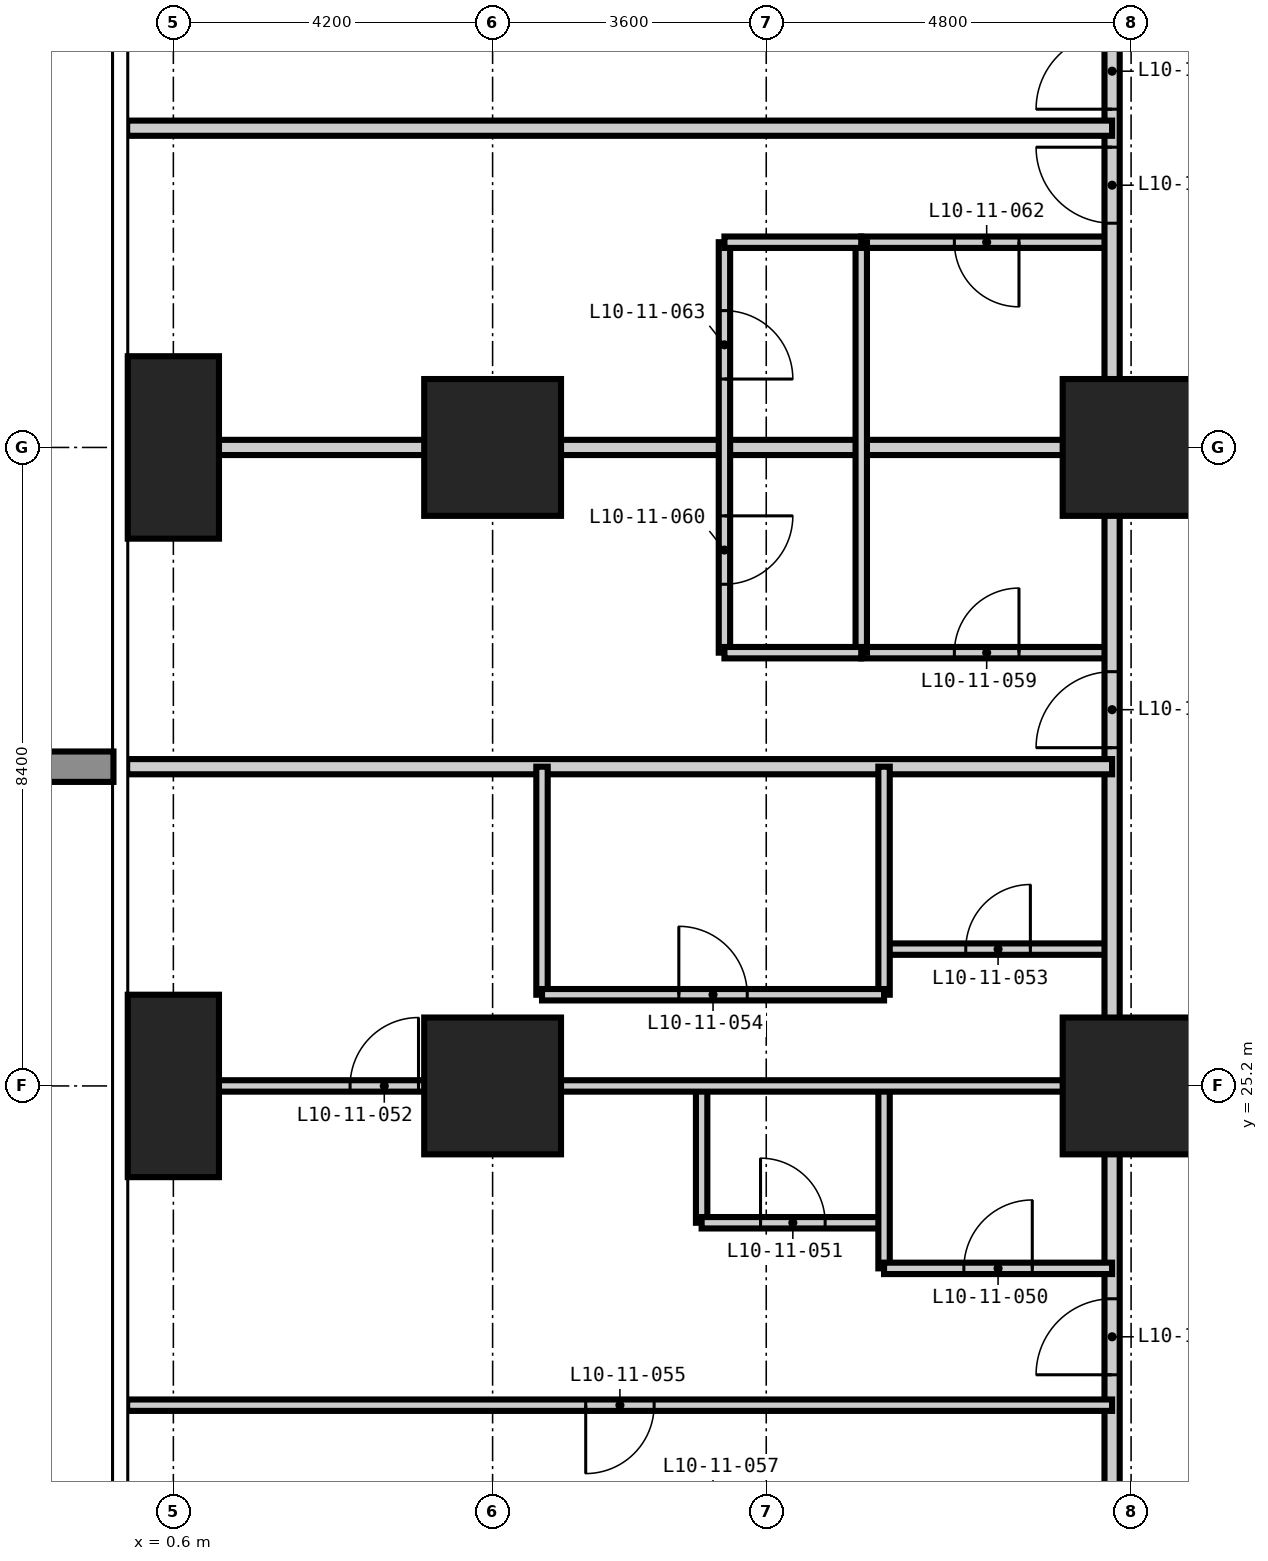
"""IFC4 building model, lengths in metres.
Left out: names, types, materials, properties, quantities, classifications, styles, units other than length and angle.
Written with IfcOpenShell. Run it as: python <this file> out.ifc"""

import sys

from ifc_helpers import new_model, si_unit, direction, frame, frame_2d, origin, origin_2d, place, context, subcontext, project, spatial, rectangle, extrude, element, fill, save


model = new_model("IFC4")
c1 = context("Model", 3, precision=1e-05, world=origin(), true_north=direction((0.0, 1.0)))
c2 = subcontext(c1, "Body", "Model", "MODEL_VIEW")
j1 = project(units=[si_unit("LENGTHUNIT", "METRE"), si_unit("PLANEANGLEUNIT", "RADIAN")], contexts=[c1])
p1 = place(None, origin())
s1 = spatial("IfcSite", under=j1, at=p1, CompositionType="ELEMENT")
p2 = place(p1, origin())
s2 = spatial("IfcBuilding", under=s1, at=p2, CompositionType="ELEMENT")
p3 = place(p2, frame((0.0, 0.0, 45.0)))
s3 = spatial("IfcBuildingStorey", under=s2, at=p3, CompositionType="ELEMENT", Elevation=45.0)
for number, where, z_axis, x_axis in (
    (1, (0.6, 25.2, -0.35), (0.0, 0.0, 1.0), (1.0, 0.0, 0.0)),
    (2, (0.6, 33.6, -0.35), (0.0, 0.0, 1.0), (1.0, 0.0, 0.0)),
):
    element("IfcColumn", number, at=place(p3, frame(where, z_axis=z_axis, x_axis=x_axis)), inside=s3, PredefinedType="COLUMN", context=c2, shape_type="SweptSolid", body=[
        extrude(rectangle(XDim=1.2, YDim=2.4, at=origin_2d()), origin(), (0.0, 0.0, 1.0), 3.6),
    ])
for number, where, z_axis, x_axis in (
    (3, (4.8, 25.2, -0.35), (0.0, 0.0, 1.0), (1.0, 0.0, 0.0)),
    (4, (4.8, 33.6, -0.35), (0.0, 0.0, 1.0), (1.0, 0.0, 0.0)),
    (5, (13.2, 25.2, -0.35), (0.0, 0.0, 1.0), (1.0, 0.0, 0.0)),
    (6, (13.2, 33.6, -0.35), (0.0, 0.0, 1.0), (1.0, 0.0, 0.0)),
):
    element("IfcColumn", number, at=place(p3, frame(where, z_axis=z_axis, x_axis=x_axis)), inside=s3, PredefinedType="COLUMN", context=c2, shape_type="SweptSolid", body=[
        extrude(rectangle(XDim=1.8, YDim=1.8, at=origin_2d()), origin(), (0.0, 0.0, 1.0), 3.6),
    ])
p4 = place(p3, frame((7.55, 23.4, 0.0), z_axis=(0.0, 0.0, 1.0), x_axis=(0.0, 1.0, 0.0)))
e7 = element("IfcWall", 7, at=p4, inside=s3, PredefinedType="PARTITIONING", context=c2, shape_type="SweptSolid", body=[
    extrude(rectangle(XDim=1.8, YDim=0.15, at=frame_2d((0.9, 0.0))), origin(), (0.0, 0.0, 1.0), 3.25),
])
p5 = place(p3, frame((7.55, 23.4, 0.0), z_axis=(0.0, 0.0, 1.0), x_axis=(1.0, 0.0, 0.0)))
e8 = element("IfcWall", 8, at=p5, inside=s3, PredefinedType="PARTITIONING", context=c2, shape_type="SweptSolid", body=[
    extrude(rectangle(XDim=2.4, YDim=0.15, at=frame_2d((1.2, 0.0))), origin(), (0.0, 0.0, 1.0), 3.25),
])
p6 = place(p5, frame((0.775, 0.0, 0.0)))
e9 = element("IfcOpeningElement", 9, at=p6, cuts=e8, PredefinedType="OPENING", context=c2, shape_type="SweptSolid", body=[
    extrude(rectangle(XDim=0.85, YDim=2.1, at=frame_2d((0.425, 1.05))), frame((0.0, 0.085, 0.0), z_axis=(0.0, -1.0, 0.0), x_axis=(1.0, 0.0, 0.0)), (0.0, 0.0, 1.0), 0.17),
])
p7 = place(p3, frame((9.95, 27.0, 0.0), z_axis=(0.0, 0.0, 1.0), x_axis=(1.0, 0.0, 0.0)))
e10 = element("IfcWall", 10, at=p7, inside=s3, PredefinedType="PARTITIONING", context=c2, shape_type="SweptSolid", body=[
    extrude(rectangle(XDim=3.0, YDim=0.15, at=frame_2d((1.5, 0.0))), origin(), (0.0, 0.0, 1.0), 3.25),
])
p8 = place(p7, frame((1.075, 0.0, 0.0)))
e11 = element("IfcOpeningElement", 11, at=p8, cuts=e10, PredefinedType="OPENING", context=c2, shape_type="SweptSolid", body=[
    extrude(rectangle(XDim=0.85, YDim=2.1, at=frame_2d((0.425, 1.05))), frame((0.0, 0.085, 0.0), z_axis=(0.0, -1.0, 0.0), x_axis=(1.0, 0.0, 0.0)), (0.0, 0.0, 1.0), 0.17),
])
p9 = place(p3, frame((9.65, 30.9, 0.0), z_axis=(0.0, 0.0, 1.0), x_axis=(1.0, 0.0, 0.0)))
e12 = element("IfcWall", 12, at=p9, inside=s3, PredefinedType="PARTITIONING", context=c2, shape_type="SweptSolid", body=[
    extrude(rectangle(XDim=3.3, YDim=0.15, at=frame_2d((1.65, 0.0))), origin(), (0.0, 0.0, 1.0), 3.25),
])
p10 = place(p9, frame((1.225, 0.0, 0.0)))
e13 = element("IfcOpeningElement", 13, at=p10, cuts=e12, PredefinedType="OPENING", context=c2, shape_type="SweptSolid", body=[
    extrude(rectangle(XDim=0.85, YDim=2.1, at=frame_2d((0.425, 1.05))), frame((0.0, 0.085, 0.0), z_axis=(0.0, -1.0, 0.0), x_axis=(1.0, 0.0, 0.0)), (0.0, 0.0, 1.0), 0.17),
])
p11 = place(p3, frame((9.65, 36.3, 0.0), z_axis=(0.0, 0.0, 1.0), x_axis=(1.0, 0.0, 0.0)))
e14 = element("IfcWall", 14, at=p11, inside=s3, PredefinedType="PARTITIONING", context=c2, shape_type="SweptSolid", body=[
    extrude(rectangle(XDim=3.3, YDim=0.15, at=frame_2d((1.65, 0.0))), origin(), (0.0, 0.0, 1.0), 3.25),
])
p12 = place(p11, frame((1.225, 0.0, 0.0)))
e15 = element("IfcOpeningElement", 15, at=p12, cuts=e14, PredefinedType="OPENING", context=c2, shape_type="SweptSolid", body=[
    extrude(rectangle(XDim=0.85, YDim=2.1, at=frame_2d((0.425, 1.05))), frame((0.0, 0.085, 0.0), z_axis=(0.0, -1.0, 0.0), x_axis=(1.0, 0.0, 0.0)), (0.0, 0.0, 1.0), 0.17),
])
p13 = place(p3, frame((12.95, 12.95, 0.0), z_axis=(0.0, 0.0, 1.0), x_axis=(0.0, 1.0, 0.0)))
e16 = element("IfcWall", 16, at=p13, inside=s3, PredefinedType="PARTITIONING", context=c2, shape_type="SweptSolid", body=[
    extrude(rectangle(XDim=32.6, YDim=0.2, at=frame_2d((16.3, 0.0))), origin(), (0.0, 0.0, 1.0), 3.25),
])
p14 = place(p13, frame((8.45, 0.0, 0.0)))
e17 = element("IfcOpeningElement", 17, at=p14, cuts=e16, PredefinedType="OPENING", context=c2, shape_type="SweptSolid", body=[
    extrude(rectangle(XDim=1.0, YDim=2.2, at=frame_2d((0.5, 1.1))), frame((0.0, 0.11, 0.0), z_axis=(0.0, -1.0, 0.0), x_axis=(1.0, 0.0, 0.0)), (0.0, 0.0, 1.0), 0.22),
])
p15 = place(p13, frame((16.7, 0.0, 0.0)))
e18 = element("IfcOpeningElement", 18, at=p15, cuts=e16, PredefinedType="OPENING", context=c2, shape_type="SweptSolid", body=[
    extrude(rectangle(XDim=1.0, YDim=2.2, at=frame_2d((0.5, 1.1))), frame((0.0, 0.11, 0.0), z_axis=(0.0, -1.0, 0.0), x_axis=(1.0, 0.0, 0.0)), (0.0, 0.0, 1.0), 0.22),
])
p16 = place(p13, frame((23.6, 0.0, 0.0)))
e19 = element("IfcOpeningElement", 19, at=p16, cuts=e16, PredefinedType="OPENING", context=c2, shape_type="SweptSolid", body=[
    extrude(rectangle(XDim=1.0, YDim=2.2, at=frame_2d((0.5, 1.1))), frame((0.0, 0.11, 0.0), z_axis=(0.0, -1.0, 0.0), x_axis=(1.0, 0.0, 0.0)), (0.0, 0.0, 1.0), 0.22),
])
p17 = place(p13, frame((25.1, 0.0, 0.0)))
e20 = element("IfcOpeningElement", 20, at=p17, cuts=e16, PredefinedType="OPENING", context=c2, shape_type="SweptSolid", body=[
    extrude(rectangle(XDim=1.0, YDim=2.2, at=frame_2d((0.5, 1.1))), frame((0.0, 0.11, 0.0), z_axis=(0.0, -1.0, 0.0), x_axis=(1.0, 0.0, 0.0)), (0.0, 0.0, 1.0), 0.22),
])
p18 = place(p13, frame((1.425, 0.0, 0.0)))
e21 = element("IfcOpeningElement", 21, at=p18, cuts=e16, PredefinedType="OPENING", context=c2, shape_type="SweptSolid", body=[
    extrude(rectangle(XDim=1.0, YDim=2.2, at=frame_2d((0.5, 1.1))), frame((0.0, 0.11, 0.0), z_axis=(0.0, -1.0, 0.0), x_axis=(1.0, 0.0, 0.0)), (0.0, 0.0, 1.0), 0.22),
])
p19 = place(p13, frame((30.325, 0.0, 0.0)))
e22 = element("IfcOpeningElement", 22, at=p19, cuts=e16, PredefinedType="OPENING", context=c2, shape_type="SweptSolid", body=[
    extrude(rectangle(XDim=1.0, YDim=2.2, at=frame_2d((0.5, 1.1))), frame((0.0, 0.11, 0.0), z_axis=(0.0, -1.0, 0.0), x_axis=(1.0, 0.0, 0.0)), (0.0, 0.0, 1.0), 0.22),
])
for number, where, z_axis, x_axis in (
    (23, (-0.008, 29.4, 0.0), (0.0, 0.0, 1.0), (1.0, 0.0, 0.0)),
    (24, (-0.008, 33.6, 0.0), (0.0, 0.0, 1.0), (1.0, 0.0, 0.0)),
    (25, (-0.008, 37.8, 0.0), (0.0, 0.0, 1.0), (1.0, 0.0, 0.0)),
):
    element("IfcWall", number, at=place(p3, frame(where, z_axis=z_axis, x_axis=x_axis)), inside=s3, PredefinedType="PARTITIONING", context=c2, shape_type="SweptSolid", body=[
        extrude(rectangle(XDim=12.958, YDim=0.2, at=frame_2d((6.479, 0.0))), origin(), (0.0, 0.0, 1.0), 3.25),
    ])
p20 = place(p3, frame((5.45, 26.4, 0.0), z_axis=(0.0, 0.0, 1.0), x_axis=(0.0, 1.0, 0.0)))
e26 = element("IfcWall", 26, at=p20, inside=s3, PredefinedType="PARTITIONING", context=c2, shape_type="SweptSolid", body=[
    extrude(rectangle(XDim=3.0, YDim=0.15, at=frame_2d((1.5, 0.0))), origin(), (0.0, 0.0, 1.0), 3.25),
])
p21 = place(p3, frame((7.85, 30.9, 0.0), z_axis=(0.0, 0.0, 1.0), x_axis=(0.0, 1.0, 0.0)))
e27 = element("IfcWall", 27, at=p21, inside=s3, PredefinedType="PARTITIONING", context=c2, shape_type="SweptSolid", body=[
    extrude(rectangle(XDim=5.4, YDim=0.15, at=frame_2d((2.7, 0.0))), origin(), (0.0, 0.0, 1.0), 3.25),
])
p22 = place(p21, frame((0.9, 0.0, 0.0)))
e28 = element("IfcOpeningElement", 28, at=p22, cuts=e27, PredefinedType="OPENING", context=c2, shape_type="SweptSolid", body=[
    extrude(rectangle(XDim=0.9, YDim=2.1, at=frame_2d((0.45, 1.05))), frame((0.0, 0.085, 0.0), z_axis=(0.0, -1.0, 0.0), x_axis=(1.0, 0.0, 0.0)), (0.0, 0.0, 1.0), 0.17),
])
p23 = place(p21, frame((3.6, 0.0, 0.0)))
e29 = element("IfcOpeningElement", 29, at=p23, cuts=e27, PredefinedType="OPENING", context=c2, shape_type="SweptSolid", body=[
    extrude(rectangle(XDim=0.9, YDim=2.1, at=frame_2d((0.45, 1.05))), frame((0.0, 0.085, 0.0), z_axis=(0.0, -1.0, 0.0), x_axis=(1.0, 0.0, 0.0)), (0.0, 0.0, 1.0), 0.17),
])
p24 = place(p3, frame((9.65, 30.9, 0.0), z_axis=(0.0, 0.0, 1.0), x_axis=(0.0, 1.0, 0.0)))
e30 = element("IfcWall", 30, at=p24, inside=s3, PredefinedType="PARTITIONING", context=c2, shape_type="SweptSolid", body=[
    extrude(rectangle(XDim=5.4, YDim=0.15, at=frame_2d((2.7, 0.0))), origin(), (0.0, 0.0, 1.0), 3.25),
])
p25 = place(p3, frame((9.95, 22.8, 0.0), z_axis=(0.0, 0.0, 1.0), x_axis=(0.0, 1.0, 0.0)))
e31 = element("IfcWall", 31, at=p25, inside=s3, PredefinedType="PARTITIONING", context=c2, shape_type="SweptSolid", body=[
    extrude(rectangle(XDim=2.4, YDim=0.15, at=frame_2d((1.2, 0.0))), origin(), (0.0, 0.0, 1.0), 3.25),
])
p26 = place(p3, frame((9.95, 26.4, 0.0), z_axis=(0.0, 0.0, 1.0), x_axis=(0.0, 1.0, 0.0)))
e32 = element("IfcWall", 32, at=p26, inside=s3, PredefinedType="PARTITIONING", context=c2, shape_type="SweptSolid", body=[
    extrude(rectangle(XDim=3.0, YDim=0.15, at=frame_2d((1.5, 0.0))), origin(), (0.0, 0.0, 1.0), 3.25),
])
p27 = place(p3, frame((-0.008, 21.0, 0.0), z_axis=(0.0, 0.0, 1.0), x_axis=(1.0, 0.0, 0.0)))
e33 = element("IfcWall", 33, at=p27, inside=s3, PredefinedType="PARTITIONING", context=c2, shape_type="SweptSolid", body=[
    extrude(rectangle(XDim=12.958, YDim=0.15, at=frame_2d((6.479, 0.0))), origin(), (0.0, 0.0, 1.0), 3.25),
])
p28 = place(p27, frame((6.033, 0.0, 0.0)))
e34 = element("IfcOpeningElement", 34, at=p28, cuts=e33, PredefinedType="OPENING", context=c2, shape_type="SweptSolid", body=[
    extrude(rectangle(XDim=0.9, YDim=2.1, at=frame_2d((0.45, 1.05))), frame((0.0, 0.085, 0.0), z_axis=(0.0, -1.0, 0.0), x_axis=(1.0, 0.0, 0.0)), (0.0, 0.0, 1.0), 0.17),
])
p29 = place(p3, frame((9.95, 22.8, 0.0), z_axis=(0.0, 0.0, 1.0), x_axis=(1.0, 0.0, 0.0)))
e35 = element("IfcWall", 35, at=p29, inside=s3, PredefinedType="PARTITIONING", context=c2, shape_type="SweptSolid", body=[
    extrude(rectangle(XDim=3.0, YDim=0.15, at=frame_2d((1.5, 0.0))), origin(), (0.0, 0.0, 1.0), 3.25),
])
p30 = place(p29, frame((1.05, 0.0, 0.0)))
e36 = element("IfcOpeningElement", 36, at=p30, cuts=e35, PredefinedType="OPENING", context=c2, shape_type="SweptSolid", body=[
    extrude(rectangle(XDim=0.9, YDim=2.1, at=frame_2d((0.45, 1.05))), frame((0.0, 0.085, 0.0), z_axis=(0.0, -1.0, 0.0), x_axis=(1.0, 0.0, 0.0)), (0.0, 0.0, 1.0), 0.17),
])
p31 = place(p3, frame((-0.008, 25.2, 0.0), z_axis=(0.0, 0.0, 1.0), x_axis=(1.0, 0.0, 0.0)))
e37 = element("IfcWall", 37, at=p31, inside=s3, PredefinedType="PARTITIONING", context=c2, shape_type="SweptSolid", body=[
    extrude(rectangle(XDim=12.958, YDim=0.15, at=frame_2d((6.479, 0.0))), origin(), (0.0, 0.0, 1.0), 3.25),
])
p32 = place(p31, frame((2.933, 0.0, 0.0)))
e38 = element("IfcOpeningElement", 38, at=p32, cuts=e37, PredefinedType="OPENING", context=c2, shape_type="SweptSolid", body=[
    extrude(rectangle(XDim=0.9, YDim=2.1, at=frame_2d((0.45, 1.05))), frame((0.0, 0.085, 0.0), z_axis=(0.0, -1.0, 0.0), x_axis=(1.0, 0.0, 0.0)), (0.0, 0.0, 1.0), 0.17),
])
p33 = place(p3, frame((5.45, 26.4, 0.0), z_axis=(0.0, 0.0, 1.0), x_axis=(1.0, 0.0, 0.0)))
e39 = element("IfcWall", 39, at=p33, inside=s3, PredefinedType="PARTITIONING", context=c2, shape_type="SweptSolid", body=[
    extrude(rectangle(XDim=4.5, YDim=0.15, at=frame_2d((2.25, 0.0))), origin(), (0.0, 0.0, 1.0), 3.25),
])
p34 = place(p33, frame((1.8, 0.0, 0.0)))
e40 = element("IfcOpeningElement", 40, at=p34, cuts=e39, PredefinedType="OPENING", context=c2, shape_type="SweptSolid", body=[
    extrude(rectangle(XDim=0.9, YDim=2.1, at=frame_2d((0.45, 1.05))), frame((0.0, 0.085, 0.0), z_axis=(0.0, -1.0, 0.0), x_axis=(1.0, 0.0, 0.0)), (0.0, 0.0, 1.0), 0.17),
])
for number, where, z_axis, x_axis in (
    (41, (7.85, 30.9, 0.0), (0.0, 0.0, 1.0), (1.0, 0.0, 0.0)),
    (42, (7.85, 36.3, 0.0), (0.0, 0.0, 1.0), (1.0, 0.0, 0.0)),
):
    element("IfcWall", number, at=place(p3, frame(where, z_axis=z_axis, x_axis=x_axis)), inside=s3, PredefinedType="PARTITIONING", context=c2, shape_type="SweptSolid", body=[
        extrude(rectangle(XDim=1.8, YDim=0.15, at=frame_2d((0.9, 0.0))), origin(), (0.0, 0.0, 1.0), 3.25),
    ])
p35 = place(p14, origin())
e43 = element("IfcDoor", 43, at=p35, inside=s3, OperationType="SINGLE_SWING_LEFT", PredefinedType="DOOR", context=c2, shape_type="SweptSolid", body=[
    extrude(rectangle(XDim=1.0, YDim=2.2, at=frame_2d((0.5, 1.1))), frame((0.0, 0.025, 0.0), z_axis=(0.0, -1.0, 0.0), x_axis=(1.0, 0.0, 0.0)), (0.0, 0.0, 1.0), 0.05),
])
fill(e17, e43)
p36 = place(p30, origin())
e44 = element("IfcDoor", 44, at=p36, inside=s3, OperationType="SINGLE_SWING_RIGHT", PredefinedType="DOOR", context=c2, shape_type="SweptSolid", body=[
    extrude(rectangle(XDim=0.9, YDim=2.1, at=frame_2d((0.45, 1.05))), frame((0.0, 0.025, 0.0), z_axis=(0.0, -1.0, 0.0), x_axis=(1.0, 0.0, 0.0)), (0.0, 0.0, 1.0), 0.05),
])
fill(e36, e44)
p37 = place(p6, origin())
e45 = element("IfcDoor", 45, at=p37, inside=s3, OperationType="SINGLE_SWING_LEFT", PredefinedType="DOOR", context=c2, shape_type="SweptSolid", body=[
    extrude(rectangle(XDim=0.85, YDim=2.1, at=frame_2d((0.425, 1.05))), frame((0.0, 0.025, 0.0), z_axis=(0.0, -1.0, 0.0), x_axis=(1.0, 0.0, 0.0)), (0.0, 0.0, 1.0), 0.05),
])
fill(e9, e45)
p38 = place(p32, origin())
e46 = element("IfcDoor", 46, at=p38, inside=s3, OperationType="SINGLE_SWING_RIGHT", PredefinedType="DOOR", context=c2, shape_type="SweptSolid", body=[
    extrude(rectangle(XDim=0.9, YDim=2.1, at=frame_2d((0.45, 1.05))), frame((0.0, 0.025, 0.0), z_axis=(0.0, -1.0, 0.0), x_axis=(1.0, 0.0, 0.0)), (0.0, 0.0, 1.0), 0.05),
])
fill(e38, e46)
p39 = place(p8, origin())
e47 = element("IfcDoor", 47, at=p39, inside=s3, OperationType="SINGLE_SWING_RIGHT", PredefinedType="DOOR", context=c2, shape_type="SweptSolid", body=[
    extrude(rectangle(XDim=0.85, YDim=2.1, at=frame_2d((0.425, 1.05))), frame((0.0, 0.025, 0.0), z_axis=(0.0, -1.0, 0.0), x_axis=(1.0, 0.0, 0.0)), (0.0, 0.0, 1.0), 0.05),
])
fill(e11, e47)
p40 = place(p34, origin())
e48 = element("IfcDoor", 48, at=p40, inside=s3, OperationType="SINGLE_SWING_LEFT", PredefinedType="DOOR", context=c2, shape_type="SweptSolid", body=[
    extrude(rectangle(XDim=0.9, YDim=2.1, at=frame_2d((0.45, 1.05))), frame((0.0, 0.025, 0.0), z_axis=(0.0, -1.0, 0.0), x_axis=(1.0, 0.0, 0.0)), (0.0, 0.0, 1.0), 0.05),
])
fill(e40, e48)
p41 = place(p28, frame((0.9, 0.0, 0.0), z_axis=(0.0, 0.0, 1.0), x_axis=(-1.0, 0.0, 0.0)))
e49 = element("IfcDoor", 49, at=p41, inside=s3, OperationType="SINGLE_SWING_RIGHT", PredefinedType="DOOR", context=c2, shape_type="SweptSolid", body=[
    extrude(rectangle(XDim=0.9, YDim=2.1, at=frame_2d((0.45, 1.05))), frame((0.0, 0.025, 0.0), z_axis=(0.0, -1.0, 0.0), x_axis=(1.0, 0.0, 0.0)), (0.0, 0.0, 1.0), 0.05),
])
fill(e34, e49)
p42 = place(p15, origin())
e50 = element("IfcDoor", 50, at=p42, inside=s3, OperationType="SINGLE_SWING_LEFT", PredefinedType="DOOR", context=c2, shape_type="SweptSolid", body=[
    extrude(rectangle(XDim=1.0, YDim=2.2, at=frame_2d((0.5, 1.1))), frame((0.0, 0.025, 0.0), z_axis=(0.0, -1.0, 0.0), x_axis=(1.0, 0.0, 0.0)), (0.0, 0.0, 1.0), 0.05),
])
fill(e18, e50)
p43 = place(p10, origin())
e51 = element("IfcDoor", 51, at=p43, inside=s3, OperationType="SINGLE_SWING_RIGHT", PredefinedType="DOOR", context=c2, shape_type="SweptSolid", body=[
    extrude(rectangle(XDim=0.85, YDim=2.1, at=frame_2d((0.425, 1.05))), frame((0.0, 0.025, 0.0), z_axis=(0.0, -1.0, 0.0), x_axis=(1.0, 0.0, 0.0)), (0.0, 0.0, 1.0), 0.05),
])
fill(e13, e51)
p44 = place(p22, frame((0.9, 0.0, 0.0), z_axis=(0.0, 0.0, 1.0), x_axis=(-1.0, 0.0, 0.0)))
e52 = element("IfcDoor", 52, at=p44, inside=s3, OperationType="SINGLE_SWING_LEFT", PredefinedType="DOOR", context=c2, shape_type="SweptSolid", body=[
    extrude(rectangle(XDim=0.9, YDim=2.1, at=frame_2d((0.45, 1.05))), frame((0.0, 0.025, 0.0), z_axis=(0.0, -1.0, 0.0), x_axis=(1.0, 0.0, 0.0)), (0.0, 0.0, 1.0), 0.05),
])
fill(e28, e52)
p45 = place(p16, origin())
e53 = element("IfcDoor", 53, at=p45, inside=s3, OperationType="SINGLE_SWING_RIGHT", PredefinedType="DOOR", context=c2, shape_type="SweptSolid", body=[
    extrude(rectangle(XDim=1.0, YDim=2.2, at=frame_2d((0.5, 1.1))), frame((0.0, 0.025, 0.0), z_axis=(0.0, -1.0, 0.0), x_axis=(1.0, 0.0, 0.0)), (0.0, 0.0, 1.0), 0.05),
])
fill(e19, e53)
p46 = place(p12, frame((0.85, 0.0, 0.0), z_axis=(0.0, 0.0, 1.0), x_axis=(-1.0, 0.0, 0.0)))
e54 = element("IfcDoor", 54, at=p46, inside=s3, OperationType="SINGLE_SWING_LEFT", PredefinedType="DOOR", context=c2, shape_type="SweptSolid", body=[
    extrude(rectangle(XDim=0.85, YDim=2.1, at=frame_2d((0.425, 1.05))), frame((0.0, 0.025, 0.0), z_axis=(0.0, -1.0, 0.0), x_axis=(1.0, 0.0, 0.0)), (0.0, 0.0, 1.0), 0.05),
])
fill(e15, e54)
p47 = place(p23, frame((0.9, 0.0, 0.0), z_axis=(0.0, 0.0, 1.0), x_axis=(-1.0, 0.0, 0.0)))
e55 = element("IfcDoor", 55, at=p47, inside=s3, OperationType="SINGLE_SWING_RIGHT", PredefinedType="DOOR", context=c2, shape_type="SweptSolid", body=[
    extrude(rectangle(XDim=0.9, YDim=2.1, at=frame_2d((0.45, 1.05))), frame((0.0, 0.025, 0.0), z_axis=(0.0, -1.0, 0.0), x_axis=(1.0, 0.0, 0.0)), (0.0, 0.0, 1.0), 0.05),
])
fill(e29, e55)
p48 = place(p17, origin())
e56 = element("IfcDoor", 56, at=p48, inside=s3, OperationType="SINGLE_SWING_LEFT", PredefinedType="DOOR", context=c2, shape_type="SweptSolid", body=[
    extrude(rectangle(XDim=1.0, YDim=2.2, at=frame_2d((0.5, 1.1))), frame((0.0, 0.025, 0.0), z_axis=(0.0, -1.0, 0.0), x_axis=(1.0, 0.0, 0.0)), (0.0, 0.0, 1.0), 0.05),
])
fill(e20, e56)
save(model, sys.argv[1])
